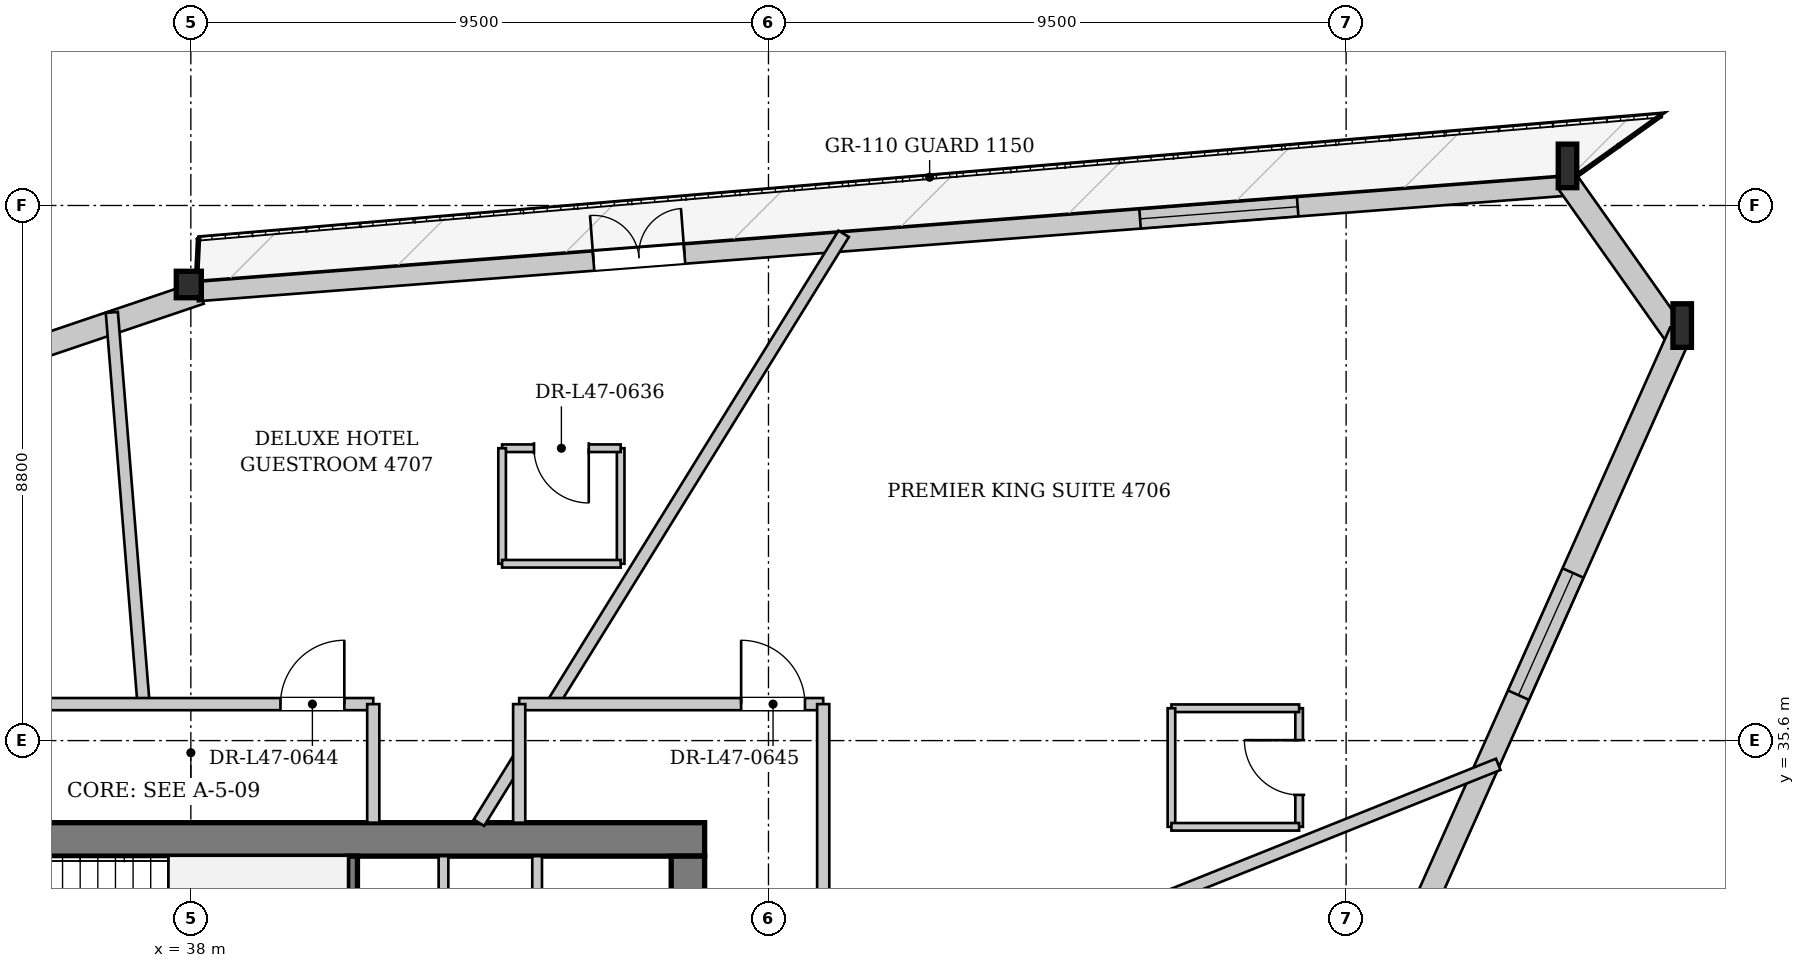
"""IFC4 building model, lengths in metres.
Left out: names, types, materials, properties, quantities, classifications, styles, units other than length and angle.
Written with IfcOpenShell. Run it as: python <this file> out.ifc"""

import sys

from ifc_helpers import new_model, si_unit, direction, frame, frame_2d, origin, origin_2d, place, context, subcontext, project, spatial, rectangle, i_section, extrude, source, transform, mapped, element, fill, save


model = new_model("IFC4")
c1 = context("Model", 3, precision=1e-05, world=origin(), true_north=direction((0.0, 1.0)))
c2 = subcontext(c1, "Body", "Model", "MODEL_VIEW")
j1 = project(units=[si_unit("LENGTHUNIT", "METRE"), si_unit("PLANEANGLEUNIT", "RADIAN")], contexts=[c1])
p1 = place(None, origin())
s1 = spatial("IfcSite", under=j1, at=p1, CompositionType="ELEMENT")
p2 = place(p1, origin())
s2 = spatial("IfcBuilding", under=s1, at=p2, CompositionType="ELEMENT")
p3 = place(p2, frame((0.0, 0.0, 178.55)))
s3 = spatial("IfcBuildingStorey", under=s2, at=p3, CompositionType="ELEMENT", Elevation=178.55)
m1 = source(origin(), c2, "Body", "SweptSolid", [
    extrude(i_section(OverallWidth=0.304, OverallDepth=0.716, WebThickness=0.021, FlangeThickness=0.04, at=origin_2d()), origin(), (0.0, 0.0, 1.0), 3.418),
])
p4 = place(p3, frame((62.675, 42.238, 0.0), z_axis=(-0.086416341516, 0.109555923872, 0.990217004229), x_axis=(-0.785144723535, -0.61931233082, 0.0)))
e1 = element("IfcColumn", 1, at=p4, inside=s3, PredefinedType="COLUMN", context=c2, shape_type="MappedRepresentation", body=[
    mapped(m1, transform((0.0, 0.0, 0.0), x_axis=(1.0, 0.0, 0.0), y_axis=(0.0, 1.0, 0.0), z_axis=(0.0, 0.0, 1.0), scale=1.0)),
])
m2 = source(origin(), c2, "Body", "SweptSolid", [
    extrude(i_section(OverallWidth=0.304, OverallDepth=0.716, WebThickness=0.021, FlangeThickness=0.04, at=origin_2d()), origin(), (0.0, 0.0, 1.0), 3.414),
])
p5 = place(p3, frame((60.798, 44.894, 0.0), z_axis=(-0.09210556719, 0.091962546123, 0.991493547434), x_axis=(-0.706557145383, -0.707655990088, 0.0)))
e2 = element("IfcColumn", 2, at=p5, inside=s3, PredefinedType="COLUMN", context=c2, shape_type="MappedRepresentation", body=[
    mapped(m2, transform((0.0, 0.0, 0.0), x_axis=(1.0, 0.0, 0.0), y_axis=(0.0, 1.0, 0.0), z_axis=(0.0, 0.0, 1.0), scale=1.0)),
])
m3 = source(origin(), c2, "Body", "SweptSolid", [
    extrude(i_section(OverallWidth=0.412, OverallDepth=0.435, WebThickness=0.031, FlangeThickness=0.05, at=origin_2d()), origin(), (0.0, 0.0, 1.0), 3.395),
])
p6 = place(p3, frame((38.092, 43.144, 0.0), z_axis=(-0.07370194171, -0.025526038348, 0.996953582247), x_axis=(0.327268874933, -0.944931258611, 0.0)))
e3 = element("IfcColumn", 3, at=p6, inside=s3, PredefinedType="COLUMN", context=c2, shape_type="MappedRepresentation", body=[
    mapped(m3, transform((0.0, 0.0, 0.0), x_axis=(1.0, 0.0, 0.0), y_axis=(0.0, 1.0, 0.0), z_axis=(0.0, 0.0, 1.0), scale=1.0)),
])
p7 = place(p3, frame((16.581, 35.663, 0.0), z_axis=(0.0, 0.0, 1.0), x_axis=(0.947210910962, 0.320611119822, 0.0)))
e4 = element("IfcWall", 4, at=p7, inside=s3, PredefinedType="SOLIDWALL", context=c2, shape_type="SweptSolid", body=[
    extrude(rectangle(XDim=22.774, YDim=0.38, at=frame_2d((11.387, 0.0))), origin(), (0.0, 0.0, 1.0), 2.722),
])
p8 = place(p7, frame((5.277, 0.0, 0.352)))
e5 = element("IfcOpeningElement", 5, at=p8, cuts=e4, PredefinedType="OPENING", context=c2, shape_type="SweptSolid", body=[
    extrude(rectangle(XDim=2.2, YDim=2.25, at=frame_2d((1.1, 1.125))), frame((0.0, 0.2, 0.0), z_axis=(0.0, -1.0, 0.0), x_axis=(1.0, 0.0, 0.0)), (0.0, 0.0, 1.0), 0.4),
])
p9 = place(p7, frame((15.297, 0.0, 0.352)))
e6 = element("IfcOpeningElement", 6, at=p9, cuts=e4, PredefinedType="OPENING", context=c2, shape_type="SweptSolid", body=[
    extrude(rectangle(XDim=2.2, YDim=2.25, at=frame_2d((1.1, 1.125))), frame((0.0, 0.2, 0.0), z_axis=(0.0, -1.0, 0.0), x_axis=(1.0, 0.0, 0.0)), (0.0, 0.0, 1.0), 0.4),
])
p10 = place(p3, frame((38.104, 42.985, 0.0), z_axis=(0.0, 0.0, 1.0), x_axis=(0.997043186839, 0.076843240291, 0.0)))
e7 = element("IfcWall", 7, at=p10, inside=s3, PredefinedType="SOLIDWALL", context=c2, shape_type="SweptSolid", body=[
    extrude(rectangle(XDim=22.774, YDim=0.32, at=frame_2d((11.387, 0.0))), origin(), (0.0, 0.0, 1.0), 2.722),
])
p11 = place(p10, frame((6.538, 0.0, 0.0)))
e8 = element("IfcOpeningElement", 8, at=p11, cuts=e7, PredefinedType="OPENING", context=c2, shape_type="SweptSolid", body=[
    extrude(rectangle(XDim=1.5, YDim=2.3, at=frame_2d((0.75, 1.15))), frame((0.0, 0.17, 0.0), z_axis=(0.0, -1.0, 0.0), x_axis=(1.0, 0.0, 0.0)), (0.0, 0.0, 1.0), 0.34),
])
p12 = place(p10, frame((15.553, 0.0, 0.252)))
e9 = element("IfcOpeningElement", 9, at=p12, cuts=e7, PredefinedType="OPENING", context=c2, shape_type="SweptSolid", body=[
    extrude(rectangle(XDim=2.6, YDim=2.35, at=frame_2d((1.3, 1.175))), frame((0.0, 0.17, 0.0), z_axis=(0.0, -1.0, 0.0), x_axis=(1.0, 0.0, 0.0)), (0.0, 0.0, 1.0), 0.34),
])
p13 = place(p3, frame((60.643, 44.784, 0.0), z_axis=(0.0, 0.0, 1.0), x_axis=(0.577204748186, -0.816599460367, 0.0)))
e10 = element("IfcWall", 10, at=p13, inside=s3, PredefinedType="SOLIDWALL", context=c2, shape_type="SweptSolid", body=[
    extrude(rectangle(XDim=3.252, YDim=0.38, at=frame_2d((1.626, 0.0))), origin(), (0.0, 0.0, 1.0), 2.722),
])
p14 = place(p3, frame((62.502, 42.315, 0.0), z_axis=(0.0, 0.0, 1.0), x_axis=(-0.408010166112, -0.912977384358, 0.0)))
e11 = element("IfcWall", 11, at=p14, inside=s3, PredefinedType="SOLIDWALL", context=c2, shape_type="SweptSolid", body=[
    extrude(rectangle(XDim=23.347, YDim=0.38, at=frame_2d((11.674, 0.0))), origin(), (0.0, 0.0, 1.0), 2.722),
])
p15 = place(p14, frame((4.337, 0.0, 0.352)))
e12 = element("IfcOpeningElement", 12, at=p15, cuts=e11, PredefinedType="OPENING", context=c2, shape_type="SweptSolid", body=[
    extrude(rectangle(XDim=2.2, YDim=2.25, at=frame_2d((1.1, 1.125))), frame((0.0, 0.2, 0.0), z_axis=(0.0, -1.0, 0.0), x_axis=(1.0, 0.0, 0.0)), (0.0, 0.0, 1.0), 0.4),
])
p16 = place(p14, frame((15.71, 0.0, 0.352)))
e13 = element("IfcOpeningElement", 13, at=p16, cuts=e11, PredefinedType="OPENING", context=c2, shape_type="SweptSolid", body=[
    extrude(rectangle(XDim=2.2, YDim=2.25, at=frame_2d((1.1, 1.125))), frame((0.0, 0.2, 0.0), z_axis=(0.0, -1.0, 0.0), x_axis=(1.0, 0.0, 0.0)), (0.0, 0.0, 1.0), 0.4),
])
p17 = place(p3, frame((29.55, 33.975, 0.0), z_axis=(0.0, 0.0, 1.0), x_axis=(1.0, 0.0, 0.0)))
e14 = element("IfcWall", 14, at=p17, inside=s3, PredefinedType="SHEAR", context=c2, shape_type="SweptSolid", body=[
    extrude(rectangle(XDim=16.9, YDim=0.55, at=frame_2d((8.45, 0.0))), origin(), (0.0, 0.0, 1.0), 3.33),
])
p18 = place(p17, frame((1.55, 0.0, 0.0)))
e15 = element("IfcOpeningElement", 15, at=p18, cuts=e14, PredefinedType="OPENING", context=c2, shape_type="SweptSolid", body=[
    extrude(rectangle(XDim=0.95, YDim=2.1, at=frame_2d((0.475, 1.05))), frame((0.0, 0.285, 0.0), z_axis=(0.0, -1.0, 0.0), x_axis=(1.0, 0.0, 0.0)), (0.0, 0.0, 1.0), 0.57),
])
p19 = place(p17, frame((3.93, 0.0, 0.0)))
e16 = element("IfcOpeningElement", 16, at=p19, cuts=e14, PredefinedType="OPENING", context=c2, shape_type="SweptSolid", body=[
    extrude(rectangle(XDim=1.32, YDim=2.2, at=frame_2d((0.66, 1.1))), frame((0.0, 0.285, 0.0), z_axis=(0.0, -1.0, 0.0), x_axis=(1.0, 0.0, 0.0)), (0.0, 0.0, 1.0), 0.57),
])
p20 = place(p3, frame((46.175, 33.7, 0.0), z_axis=(0.0, 0.0, 1.0), x_axis=(0.0, -1.0, 0.0)))
e17 = element("IfcWall", 17, at=p20, inside=s3, PredefinedType="SHEAR", context=c2, shape_type="SweptSolid", body=[
    extrude(rectangle(XDim=14.2, YDim=0.55, at=frame_2d((7.1, 0.0))), origin(), (0.0, 0.0, 1.0), 3.33),
])
p21 = place(p20, frame((5.18, 0.0, 0.0)))
e18 = element("IfcOpeningElement", 18, at=p21, cuts=e17, PredefinedType="OPENING", context=c2, shape_type="SweptSolid", body=[
    extrude(rectangle(XDim=1.6, YDim=2.2, at=frame_2d((0.8, 1.1))), frame((0.0, 0.285, 0.0), z_axis=(0.0, -1.0, 0.0), x_axis=(1.0, 0.0, 0.0)), (0.0, 0.0, 1.0), 0.57),
])
p22 = place(p20, frame((2.05, 0.0, 0.0)))
e19 = element("IfcOpeningElement", 19, at=p22, cuts=e17, PredefinedType="OPENING", context=c2, shape_type="SweptSolid", body=[
    extrude(rectangle(XDim=0.95, YDim=2.1, at=frame_2d((0.475, 1.05))), frame((0.0, 0.285, 0.0), z_axis=(0.0, -1.0, 0.0), x_axis=(1.0, 0.0, 0.0)), (0.0, 0.0, 1.0), 0.57),
])
p23 = place(p3, frame((40.66, 30.6, 0.0), z_axis=(0.0, 0.0, 1.0), x_axis=(0.0, 1.0, 0.0)))
e20 = element("IfcWall", 20, at=p23, inside=s3, PredefinedType="PARTITIONING", context=c2, shape_type="SweptSolid", body=[
    extrude(rectangle(XDim=3.1, YDim=0.16, at=frame_2d((1.55, 0.0))), origin(), (0.0, 0.0, 1.0), 3.33),
])
p24 = place(p3, frame((42.155, 30.68, 0.0), z_axis=(0.0, 0.0, 1.0), x_axis=(0.0, 1.0, 0.0)))
e21 = element("IfcWall", 21, at=p24, inside=s3, PredefinedType="PARTITIONING", context=c2, shape_type="SweptSolid", body=[
    extrude(rectangle(XDim=3.02, YDim=0.16, at=frame_2d((1.51, 0.0))), origin(), (0.0, 0.0, 1.0), 3.33),
])
p25 = place(p24, frame((0.95, 0.0, 0.0)))
e22 = element("IfcOpeningElement", 22, at=p25, cuts=e21, PredefinedType="OPENING", context=c2, shape_type="SweptSolid", body=[
    extrude(rectangle(XDim=0.95, YDim=2.1, at=frame_2d((0.475, 1.05))), frame((0.0, 0.09, 0.0), z_axis=(0.0, -1.0, 0.0), x_axis=(1.0, 0.0, 0.0)), (0.0, 0.0, 1.0), 0.18),
])
p26 = place(p3, frame((43.695, 30.68, 0.0), z_axis=(0.0, 0.0, 1.0), x_axis=(0.0, 1.0, 0.0)))
e23 = element("IfcWall", 23, at=p26, inside=s3, PredefinedType="PARTITIONING", context=c2, shape_type="SweptSolid", body=[
    extrude(rectangle(XDim=3.02, YDim=0.16, at=frame_2d((1.51, 0.0))), origin(), (0.0, 0.0, 1.0), 3.33),
])
p27 = place(p26, frame((0.95, 0.0, 0.0)))
e24 = element("IfcOpeningElement", 24, at=p27, cuts=e23, PredefinedType="OPENING", context=c2, shape_type="SweptSolid", body=[
    extrude(rectangle(XDim=0.95, YDim=2.1, at=frame_2d((0.475, 1.05))), frame((0.0, 0.09, 0.0), z_axis=(0.0, -1.0, 0.0), x_axis=(1.0, 0.0, 0.0)), (0.0, 0.0, 1.0), 0.18),
])
p28 = place(p3, frame((48.4, 30.764, 0.0), z_axis=(0.0, 0.0, 1.0), x_axis=(0.928341463562, 0.371728566338, 0.0)))
e25 = element("IfcWall", 25, at=p28, inside=s3, PredefinedType="PARTITIONING", context=c2, shape_type="SweptSolid", body=[
    extrude(rectangle(XDim=11.958, YDim=0.2, at=frame_2d((5.979, 0.0))), origin(), (0.0, 0.0, 1.0), 3.33),
])
p29 = place(p3, frame((42.738, 34.25, 0.0), z_axis=(0.0, 0.0, 1.0), x_axis=(0.526414798645, 0.850227886962, 0.0)))
e26 = element("IfcWall", 26, at=p29, inside=s3, PredefinedType="PARTITIONING", context=c2, shape_type="SweptSolid", body=[
    extrude(rectangle(XDim=1.257, YDim=0.2, at=frame_2d((0.628, 0.0))), origin(), (0.0, 0.0, 1.0), 3.33),
])
p30 = place(p3, frame((43.946, 36.2, 0.0), z_axis=(0.0, 0.0, 1.0), x_axis=(0.526559690384, 0.850138160808, 0.0)))
e27 = element("IfcWall", 27, at=p30, inside=s3, PredefinedType="PARTITIONING", context=c2, shape_type="SweptSolid", body=[
    extrude(rectangle(XDim=9.098, YDim=0.2, at=frame_2d((4.549, 0.0))), origin(), (0.0, 0.0, 1.0), 3.33),
])
p31 = place(p3, frame((37.222, 36.2, 0.0), z_axis=(0.0, 0.0, 1.0), x_axis=(-0.080766167067, 0.996733076735, 0.0)))
e28 = element("IfcWall", 28, at=p31, inside=s3, PredefinedType="PARTITIONING", context=c2, shape_type="SweptSolid", body=[
    extrude(rectangle(XDim=6.463, YDim=0.2, at=frame_2d((3.231, 0.0))), origin(), (0.0, 0.0, 1.0), 3.33),
])
p32 = place(p3, frame((56.227, 34.182, 0.0), z_axis=(0.0, 0.0, 1.0), x_axis=(0.0, 1.0, 0.0)))
e29 = element("IfcWall", 29, at=p32, inside=s3, PredefinedType="PARTITIONING", context=c2, shape_type="SweptSolid", body=[
    extrude(rectangle(XDim=1.95, YDim=0.125, at=frame_2d((0.975, 0.0))), origin(), (0.0, 0.0, 1.0), 3.33),
])
p33 = place(p32, frame((0.525, 0.0, 0.0)))
e30 = element("IfcOpeningElement", 30, at=p33, cuts=e29, PredefinedType="OPENING", context=c2, shape_type="SweptSolid", body=[
    extrude(rectangle(XDim=0.9, YDim=2.1, at=frame_2d((0.45, 1.05))), frame((0.0, 0.073, 0.0), z_axis=(0.0, -1.0, 0.0), x_axis=(1.0, 0.0, 0.0)), (0.0, 0.0, 1.0), 0.145),
])
p34 = place(p3, frame((56.227, 36.132, 0.0), z_axis=(0.0, 0.0, 1.0), x_axis=(-1.0, 0.0, 0.0)))
e31 = element("IfcWall", 31, at=p34, inside=s3, PredefinedType="PARTITIONING", context=c2, shape_type="SweptSolid", body=[
    extrude(rectangle(XDim=2.1, YDim=0.125, at=frame_2d((1.05, 0.0))), origin(), (0.0, 0.0, 1.0), 3.33),
])
p35 = place(p3, frame((54.127, 36.132, 0.0), z_axis=(0.0, 0.0, 1.0), x_axis=(0.0, -1.0, 0.0)))
e32 = element("IfcWall", 32, at=p35, inside=s3, PredefinedType="PARTITIONING", context=c2, shape_type="SweptSolid", body=[
    extrude(rectangle(XDim=1.95, YDim=0.125, at=frame_2d((0.975, 0.0))), origin(), (0.0, 0.0, 1.0), 3.33),
])
p36 = place(p3, frame((54.127, 34.182, 0.0), z_axis=(0.0, 0.0, 1.0), x_axis=(1.0, 0.0, 0.0)))
e33 = element("IfcWall", 33, at=p36, inside=s3, PredefinedType="PARTITIONING", context=c2, shape_type="SweptSolid", body=[
    extrude(rectangle(XDim=2.1, YDim=0.125, at=frame_2d((1.05, 0.0))), origin(), (0.0, 0.0, 1.0), 3.33),
])
p37 = place(p3, frame((45.069, 38.508, 0.0), z_axis=(0.0, 0.0, 1.0), x_axis=(0.0, 1.0, 0.0)))
e34 = element("IfcWall", 34, at=p37, inside=s3, PredefinedType="PARTITIONING", context=c2, shape_type="SweptSolid", body=[
    extrude(rectangle(XDim=1.9, YDim=0.125, at=frame_2d((0.95, 0.0))), origin(), (0.0, 0.0, 1.0), 3.33),
])
p38 = place(p3, frame((45.069, 40.408, 0.0), z_axis=(0.0, 0.0, 1.0), x_axis=(-1.0, 0.0, 0.0)))
e35 = element("IfcWall", 35, at=p38, inside=s3, PredefinedType="PARTITIONING", context=c2, shape_type="SweptSolid", body=[
    extrude(rectangle(XDim=1.95, YDim=0.125, at=frame_2d((0.975, 0.0))), origin(), (0.0, 0.0, 1.0), 3.33),
])
p39 = place(p38, frame((0.525, 0.0, 0.0)))
e36 = element("IfcOpeningElement", 36, at=p39, cuts=e35, PredefinedType="OPENING", context=c2, shape_type="SweptSolid", body=[
    extrude(rectangle(XDim=0.9, YDim=2.1, at=frame_2d((0.45, 1.05))), frame((0.0, 0.073, 0.0), z_axis=(0.0, -1.0, 0.0), x_axis=(1.0, 0.0, 0.0)), (0.0, 0.0, 1.0), 0.145),
])
p40 = place(p3, frame((43.119, 40.408, 0.0), z_axis=(0.0, 0.0, 1.0), x_axis=(0.0, -1.0, 0.0)))
e37 = element("IfcWall", 37, at=p40, inside=s3, PredefinedType="PARTITIONING", context=c2, shape_type="SweptSolid", body=[
    extrude(rectangle(XDim=1.9, YDim=0.125, at=frame_2d((0.95, 0.0))), origin(), (0.0, 0.0, 1.0), 3.33),
])
p41 = place(p3, frame((43.119, 38.508, 0.0), z_axis=(0.0, 0.0, 1.0), x_axis=(1.0, 0.0, 0.0)))
e38 = element("IfcWall", 38, at=p41, inside=s3, PredefinedType="PARTITIONING", context=c2, shape_type="SweptSolid", body=[
    extrude(rectangle(XDim=1.95, YDim=0.125, at=frame_2d((0.975, 0.0))), origin(), (0.0, 0.0, 1.0), 3.33),
])
p42 = place(p3, frame((27.6, 36.2, 0.0), z_axis=(0.0, 0.0, 1.0), x_axis=(1.0, 0.0, 0.0)))
e39 = element("IfcWall", 39, at=p42, inside=s3, PredefinedType="PARTITIONING", context=c2, shape_type="SweptSolid", body=[
    extrude(rectangle(XDim=13.4, YDim=0.2, at=frame_2d((6.7, 0.0))), origin(), (0.0, 0.0, 1.0), 3.33),
])
p43 = place(p42, frame((11.874, 0.0, 0.0)))
e40 = element("IfcOpeningElement", 40, at=p43, cuts=e39, PredefinedType="OPENING", context=c2, shape_type="SweptSolid", body=[
    extrude(rectangle(XDim=1.05, YDim=2.2, at=frame_2d((0.525, 1.1))), frame((0.0, 0.11, 0.0), z_axis=(0.0, -1.0, 0.0), x_axis=(1.0, 0.0, 0.0)), (0.0, 0.0, 1.0), 0.22),
])
p44 = place(p3, frame((41.0, 34.25, 0.0), z_axis=(0.0, 0.0, 1.0), x_axis=(0.0, 1.0, 0.0)))
e41 = element("IfcWall", 41, at=p44, inside=s3, PredefinedType="PARTITIONING", context=c2, shape_type="SweptSolid", body=[
    extrude(rectangle(XDim=1.95, YDim=0.2, at=frame_2d((0.975, 0.0))), origin(), (0.0, 0.0, 1.0), 3.33),
])
p45 = place(p3, frame((43.4, 36.2, 0.0), z_axis=(0.0, 0.0, 1.0), x_axis=(1.0, 0.0, 0.0)))
e42 = element("IfcWall", 42, at=p45, inside=s3, PredefinedType="PARTITIONING", context=c2, shape_type="SweptSolid", body=[
    extrude(rectangle(XDim=5.0, YDim=0.2, at=frame_2d((2.5, 0.0))), origin(), (0.0, 0.0, 1.0), 3.33),
])
p46 = place(p45, frame((3.65, 0.0, 0.0)))
e43 = element("IfcOpeningElement", 43, at=p46, cuts=e42, PredefinedType="OPENING", context=c2, shape_type="SweptSolid", body=[
    extrude(rectangle(XDim=1.05, YDim=2.2, at=frame_2d((0.525, 1.1))), frame((0.0, 0.11, 0.0), z_axis=(0.0, -1.0, 0.0), x_axis=(1.0, 0.0, 0.0)), (0.0, 0.0, 1.0), 0.22),
])
p47 = place(p3, frame((43.4, 34.25, 0.0), z_axis=(0.0, 0.0, 1.0), x_axis=(0.0, 1.0, 0.0)))
e44 = element("IfcWall", 44, at=p47, inside=s3, PredefinedType="PARTITIONING", context=c2, shape_type="SweptSolid", body=[
    extrude(rectangle(XDim=1.95, YDim=0.2, at=frame_2d((0.975, 0.0))), origin(), (0.0, 0.0, 1.0), 3.33),
])
p48 = place(p3, frame((48.4, 17.0, 0.0), z_axis=(0.0, 0.0, 1.0), x_axis=(0.0, 1.0, 0.0)))
e45 = element("IfcWall", 45, at=p48, inside=s3, PredefinedType="PARTITIONING", context=c2, shape_type="SweptSolid", body=[
    extrude(rectangle(XDim=19.2, YDim=0.2, at=frame_2d((9.6, 0.0))), origin(), (0.0, 0.0, 1.0), 3.33),
])
p49 = place(p48, frame((9.249, 0.0, 0.0)))
e46 = element("IfcOpeningElement", 46, at=p49, cuts=e45, PredefinedType="OPENING", context=c2, shape_type="SweptSolid", body=[
    extrude(rectangle(XDim=1.05, YDim=2.2, at=frame_2d((0.525, 1.1))), frame((0.0, 0.11, 0.0), z_axis=(0.0, -1.0, 0.0), x_axis=(1.0, 0.0, 0.0)), (0.0, 0.0, 1.0), 0.22),
])
m4 = source(origin(), c2, "Body", "SweptSolid", [
    extrude(rectangle(XDim=1.5, YDim=2.3, at=frame_2d((0.75, 1.15))), frame((0.0, 0.025, 0.0), z_axis=(0.0, -1.0, 0.0), x_axis=(1.0, 0.0, 0.0)), (0.0, 0.0, 1.0), 0.05),
])
p50 = place(p11, origin())
e47 = element("IfcDoor", 47, at=p50, inside=s3, OperationType="DOUBLE_DOOR_SINGLE_SWING", PredefinedType="DOOR", context=c2, shape_type="MappedRepresentation", body=[
    mapped(m4, transform((0.0, 0.0, 0.0), x_axis=(1.0, 0.0, 0.0), y_axis=(0.0, 1.0, 0.0), z_axis=(0.0, 0.0, 1.0), scale=1.0)),
])
fill(e8, e47)
m5 = source(origin(), c2, "Body", "SweptSolid", [
    extrude(rectangle(XDim=2.6, YDim=2.35, at=frame_2d((1.3, 1.175))), frame((0.0, 0.03, 0.0), z_axis=(0.0, -1.0, 0.0), x_axis=(1.0, 0.0, 0.0)), (0.0, 0.0, 1.0), 0.06),
])
p51 = place(p12, origin())
e48 = element("IfcWindow", 48, at=p51, inside=s3, PartitioningType="SINGLE_PANEL", PredefinedType="WINDOW", context=c2, shape_type="MappedRepresentation", body=[
    mapped(m5, transform((0.0, 0.0, 0.0), x_axis=(1.0, 0.0, 0.0), y_axis=(0.0, 1.0, 0.0), z_axis=(0.0, 0.0, 1.0), scale=1.0)),
])
fill(e9, e48)
m6 = source(origin(), c2, "Body", "SweptSolid", [
    extrude(rectangle(XDim=2.2, YDim=2.25, at=frame_2d((1.1, 1.125))), frame((0.0, 0.03, 0.0), z_axis=(0.0, -1.0, 0.0), x_axis=(1.0, 0.0, 0.0)), (0.0, 0.0, 1.0), 0.06),
])
p52 = place(p15, origin())
e49 = element("IfcWindow", 49, at=p52, inside=s3, PartitioningType="SINGLE_PANEL", PredefinedType="WINDOW", context=c2, shape_type="MappedRepresentation", body=[
    mapped(m6, transform((0.0, 0.0, 0.0), x_axis=(1.0, 0.0, 0.0), y_axis=(0.0, 1.0, 0.0), z_axis=(0.0, 0.0, 1.0), scale=1.0)),
])
fill(e12, e49)
m7 = source(origin(), c2, "Body", "SweptSolid", [
    extrude(rectangle(XDim=0.9, YDim=2.1, at=frame_2d((0.45, 1.05))), frame((0.0, 0.025, 0.0), z_axis=(0.0, -1.0, 0.0), x_axis=(1.0, 0.0, 0.0)), (0.0, 0.0, 1.0), 0.05),
])
p53 = place(p33, origin())
e50 = element("IfcDoor", 50, at=p53, inside=s3, OperationType="SINGLE_SWING_RIGHT", PredefinedType="DOOR", context=c2, shape_type="MappedRepresentation", body=[
    mapped(m7, transform((0.0, 0.0, 0.0), x_axis=(1.0, 0.0, 0.0), y_axis=(0.0, 1.0, 0.0), z_axis=(0.0, 0.0, 1.0), scale=1.0)),
])
fill(e30, e50)
p54 = place(p39, origin())
e51 = element("IfcDoor", 51, at=p54, inside=s3, OperationType="SINGLE_SWING_LEFT", PredefinedType="DOOR", context=c2, shape_type="MappedRepresentation", body=[
    mapped(m7, transform((0.0, 0.0, 0.0), x_axis=(1.0, 0.0, 0.0), y_axis=(0.0, 1.0, 0.0), z_axis=(0.0, 0.0, 1.0), scale=1.0)),
])
fill(e36, e51)
m8 = source(origin(), c2, "Body", "SweptSolid", [
    extrude(rectangle(XDim=1.05, YDim=2.2, at=frame_2d((0.525, 1.1))), frame((0.0, 0.025, 0.0), z_axis=(0.0, -1.0, 0.0), x_axis=(1.0, 0.0, 0.0)), (0.0, 0.0, 1.0), 0.05),
])
p55 = place(p43, origin())
e52 = element("IfcDoor", 52, at=p55, inside=s3, OperationType="SINGLE_SWING_RIGHT", PredefinedType="DOOR", context=c2, shape_type="MappedRepresentation", body=[
    mapped(m8, transform((0.0, 0.0, 0.0), x_axis=(1.0, 0.0, 0.0), y_axis=(0.0, 1.0, 0.0), z_axis=(0.0, 0.0, 1.0), scale=1.0)),
])
fill(e40, e52)
p56 = place(p46, origin())
e53 = element("IfcDoor", 53, at=p56, inside=s3, OperationType="SINGLE_SWING_LEFT", PredefinedType="DOOR", context=c2, shape_type="MappedRepresentation", body=[
    mapped(m8, transform((0.0, 0.0, 0.0), x_axis=(1.0, 0.0, 0.0), y_axis=(0.0, 1.0, 0.0), z_axis=(0.0, 0.0, 1.0), scale=1.0)),
])
fill(e43, e53)
save(model, sys.argv[1])
